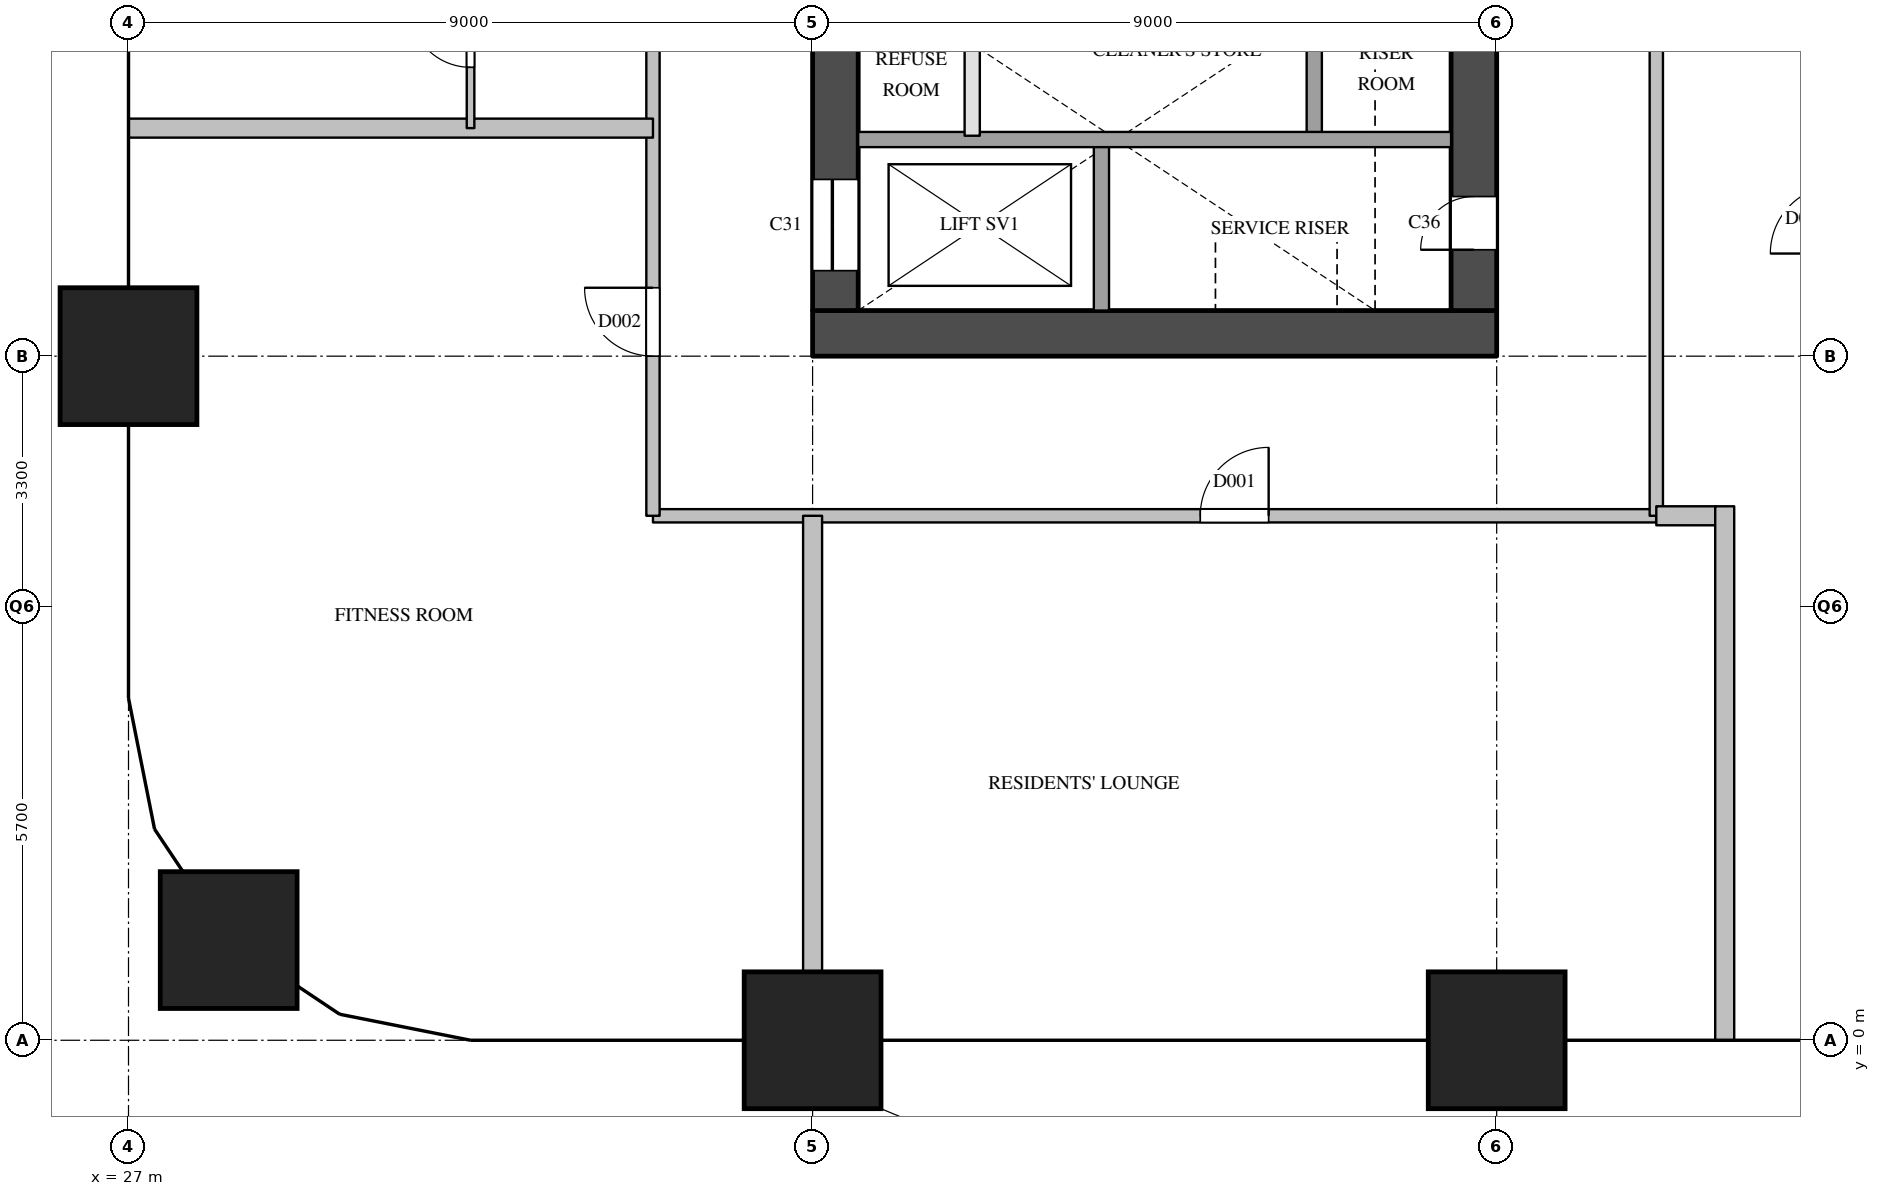
"""IFC4 building model, lengths in metres.
Left out: names, types, materials, properties, quantities, classifications, styles, units other than length and angle.
Written with IfcOpenShell. Run it as: python <this file> out.ifc"""

import sys

from ifc_helpers import new_model, si_unit, direction, frame, frame_2d, origin, origin_2d, place, context, subcontext, project, spatial, rectangle, extrude, element, fill, save


model = new_model("IFC4")
c1 = context("Model", 3, precision=1e-05, world=origin(), true_north=direction((0.0, 1.0)))
c2 = subcontext(c1, "Body", "Model", "MODEL_VIEW")
j1 = project(units=[si_unit("LENGTHUNIT", "METRE"), si_unit("PLANEANGLEUNIT", "RADIAN")], contexts=[c1])
p1 = place(None, origin())
s1 = spatial("IfcSite", under=j1, at=p1, CompositionType="ELEMENT")
p2 = place(p1, origin())
s2 = spatial("IfcBuilding", under=s1, at=p2, CompositionType="ELEMENT")
p3 = place(p2, frame((0.0, 0.0, 93.0)))
s3 = spatial("IfcBuildingStorey", under=s2, at=p3, CompositionType="ELEMENT", Elevation=93.0)
for number, where, z_axis, x_axis in (
    (1, (28.318, 1.318, 0.0), (0.0, 0.0, 1.0), (1.0, 0.0, 0.0)),
    (2, (27.0, 9.0, 0.0), (0.0, 0.0, 1.0), (1.0, 0.0, 0.0)),
    (3, (36.0, 0.0, 0.0), (0.0, 0.0, 1.0), (1.0, 0.0, 0.0)),
    (4, (45.0, 0.0, 0.0), (0.0, 0.0, 1.0), (1.0, 0.0, 0.0)),
):
    element("IfcColumn", number, at=place(p3, frame(where, z_axis=z_axis, x_axis=x_axis)), inside=s3, PredefinedType="COLUMN", context=c2, shape_type="SweptSolid", body=[
        extrude(rectangle(XDim=1.8, YDim=1.8, at=origin_2d()), origin(), (0.0, 0.0, 1.0), 3.8),
    ])
p4 = place(p3, frame((36.0, 9.3, 0.0), z_axis=(0.0, 0.0, 1.0), x_axis=(1.0, 0.0, 0.0)))
e5 = element("IfcWall", 5, at=p4, inside=s3, PredefinedType="SHEAR", context=c2, shape_type="SweptSolid", body=[
    extrude(rectangle(XDim=9.0, YDim=0.6, at=frame_2d((4.5, 0.0))), origin(), (0.0, 0.0, 1.0), 3.5),
])
p5 = place(p3, frame((36.3, 9.6, 0.0), z_axis=(0.0, 0.0, 1.0), x_axis=(0.0, 1.0, 0.0)))
e6 = element("IfcWall", 6, at=p5, inside=s3, PredefinedType="SHEAR", context=c2, shape_type="SweptSolid", body=[
    extrude(rectangle(XDim=12.3, YDim=0.6, at=frame_2d((6.15, 0.0))), origin(), (0.0, 0.0, 1.0), 3.5),
])
p6 = place(p5, frame((0.525, 0.0, 0.0)))
e7 = element("IfcOpeningElement", 7, at=p6, cuts=e6, PredefinedType="OPENING", context=c2, shape_type="SweptSolid", body=[
    extrude(rectangle(XDim=1.2, YDim=2.1, at=frame_2d((0.6, 1.05))), frame((0.0, 0.31, 0.0), z_axis=(0.0, -1.0, 0.0), x_axis=(1.0, 0.0, 0.0)), (0.0, 0.0, 1.0), 0.62),
])
p7 = place(p5, frame((4.8, 0.0, 0.0)))
e8 = element("IfcOpeningElement", 8, at=p7, cuts=e6, PredefinedType="OPENING", context=c2, shape_type="SweptSolid", body=[
    extrude(rectangle(XDim=1.0, YDim=2.1, at=frame_2d((0.5, 1.05))), frame((0.0, 0.31, 0.0), z_axis=(0.0, -1.0, 0.0), x_axis=(1.0, 0.0, 0.0)), (0.0, 0.0, 1.0), 0.62),
])
p8 = place(p3, frame((44.7, 9.6, 0.0), z_axis=(0.0, 0.0, 1.0), x_axis=(0.0, 1.0, 0.0)))
e9 = element("IfcWall", 9, at=p8, inside=s3, PredefinedType="SHEAR", context=c2, shape_type="SweptSolid", body=[
    extrude(rectangle(XDim=12.3, YDim=0.6, at=frame_2d((6.15, 0.0))), origin(), (0.0, 0.0, 1.0), 3.5),
])
p9 = place(p8, frame((0.8, 0.0, 0.0)))
e10 = element("IfcOpeningElement", 10, at=p9, cuts=e9, PredefinedType="OPENING", context=c2, shape_type="SweptSolid", body=[
    extrude(rectangle(XDim=0.7, YDim=2.1, at=frame_2d((0.35, 1.05))), frame((0.0, 0.31, 0.0), z_axis=(0.0, -1.0, 0.0), x_axis=(1.0, 0.0, 0.0)), (0.0, 0.0, 1.0), 0.62),
])
p10 = place(p3, frame((38.1, 11.9, 0.0), z_axis=(0.0, 0.0, 1.0), x_axis=(0.0, 1.0, 0.0)))
e11 = element("IfcWall", 11, at=p10, inside=s3, PredefinedType="PARTITIONING", context=c2, shape_type="SweptSolid", body=[
    extrude(rectangle(XDim=2.2, YDim=0.2, at=frame_2d((1.1, 0.0))), origin(), (0.0, 0.0, 1.0), 3.5),
])
p11 = place(p3, frame((39.8, 9.6, 0.0), z_axis=(0.0, 0.0, 1.0), x_axis=(0.0, 1.0, 0.0)))
e12 = element("IfcWall", 12, at=p11, inside=s3, PredefinedType="SOLIDWALL", context=c2, shape_type="SweptSolid", body=[
    extrude(rectangle(XDim=2.3, YDim=0.2, at=frame_2d((1.15, 0.0))), origin(), (0.0, 0.0, 1.0), 3.5),
])
p12 = place(p3, frame((42.6, 11.9, 0.0), z_axis=(0.0, 0.0, 1.0), x_axis=(0.0, 1.0, 0.0)))
e13 = element("IfcWall", 13, at=p12, inside=s3, PredefinedType="SOLIDWALL", context=c2, shape_type="SweptSolid", body=[
    extrude(rectangle(XDim=2.2, YDim=0.2, at=frame_2d((1.1, 0.0))), origin(), (0.0, 0.0, 1.0), 3.5),
])
p13 = place(p3, frame((36.6, 11.85, 0.0), z_axis=(0.0, 0.0, 1.0), x_axis=(1.0, 0.0, 0.0)))
e14 = element("IfcWall", 14, at=p13, inside=s3, PredefinedType="SOLIDWALL", context=c2, shape_type="SweptSolid", body=[
    extrude(rectangle(XDim=7.8, YDim=0.2, at=frame_2d((3.9, 0.0))), origin(), (0.0, 0.0, 1.0), 3.5),
])
p14 = place(p3, frame((33.9, 6.9, 0.0), z_axis=(0.0, 0.0, 1.0), x_axis=(1.0, 0.0, 0.0)))
e15 = element("IfcWall", 15, at=p14, inside=s3, PredefinedType="PARTITIONING", context=c2, shape_type="SweptSolid", body=[
    extrude(rectangle(XDim=13.2, YDim=0.175, at=frame_2d((6.6, 0.0))), origin(), (0.0, 0.0, 1.0), 3.5),
])
p15 = place(p14, frame((7.2, 0.0, 0.0)))
e16 = element("IfcOpeningElement", 16, at=p15, cuts=e15, PredefinedType="OPENING", context=c2, shape_type="SweptSolid", body=[
    extrude(rectangle(XDim=0.9, YDim=2.1, at=frame_2d((0.45, 1.05))), frame((0.0, 0.097, 0.0), z_axis=(0.0, -1.0, 0.0), x_axis=(1.0, 0.0, 0.0)), (0.0, 0.0, 1.0), 0.195),
])
p16 = place(p3, frame((33.9, 6.9, 0.0), z_axis=(0.0, 0.0, 1.0), x_axis=(0.0, 1.0, 0.0)))
e17 = element("IfcWall", 17, at=p16, inside=s3, PredefinedType="PARTITIONING", context=c2, shape_type="SweptSolid", body=[
    extrude(rectangle(XDim=17.69, YDim=0.175, at=frame_2d((8.845, 0.0))), origin(), (0.0, 0.0, 1.0), 3.5),
])
p17 = place(p16, frame((2.1, 0.0, 0.0)))
e18 = element("IfcOpeningElement", 18, at=p17, cuts=e17, PredefinedType="OPENING", context=c2, shape_type="SweptSolid", body=[
    extrude(rectangle(XDim=0.9, YDim=2.1, at=frame_2d((0.45, 1.05))), frame((0.0, 0.097, 0.0), z_axis=(0.0, -1.0, 0.0), x_axis=(1.0, 0.0, 0.0)), (0.0, 0.0, 1.0), 0.195),
])
p18 = place(p16, frame((8.8, 0.0, 0.0)))
e19 = element("IfcOpeningElement", 19, at=p18, cuts=e17, PredefinedType="OPENING", context=c2, shape_type="SweptSolid", body=[
    extrude(rectangle(XDim=1.0, YDim=2.1, at=frame_2d((0.5, 1.05))), frame((0.0, 0.097, 0.0), z_axis=(0.0, -1.0, 0.0), x_axis=(1.0, 0.0, 0.0)), (0.0, 0.0, 1.0), 0.195),
])
p19 = place(p16, frame((14.8, 0.0, 0.0)))
e20 = element("IfcOpeningElement", 20, at=p19, cuts=e17, PredefinedType="OPENING", context=c2, shape_type="SweptSolid", body=[
    extrude(rectangle(XDim=1.0, YDim=2.1, at=frame_2d((0.5, 1.05))), frame((0.0, 0.097, 0.0), z_axis=(0.0, -1.0, 0.0), x_axis=(1.0, 0.0, 0.0)), (0.0, 0.0, 1.0), 0.195),
])
p20 = place(p3, frame((47.1, 6.9, 0.0), z_axis=(0.0, 0.0, 1.0), x_axis=(0.0, 1.0, 0.0)))
e21 = element("IfcWall", 21, at=p20, inside=s3, PredefinedType="PARTITIONING", context=c2, shape_type="SweptSolid", body=[
    extrude(rectangle(XDim=17.09, YDim=0.175, at=frame_2d((8.545, 0.0))), origin(), (0.0, 0.0, 1.0), 3.5),
])
p21 = place(p20, frame((9.4, 0.0, 0.0)))
e22 = element("IfcOpeningElement", 22, at=p21, cuts=e21, PredefinedType="OPENING", context=c2, shape_type="SweptSolid", body=[
    extrude(rectangle(XDim=1.0, YDim=2.1, at=frame_2d((0.5, 1.05))), frame((0.0, 0.097, 0.0), z_axis=(0.0, -1.0, 0.0), x_axis=(1.0, 0.0, 0.0)), (0.0, 0.0, 1.0), 0.195),
])
p22 = place(p3, frame((47.1, 6.9, 0.0), z_axis=(0.0, 0.0, 1.0), x_axis=(1.0, 0.0, 0.0)))
e23 = element("IfcWall", 23, at=p22, inside=s3, PredefinedType="PARTITIONING", context=c2, shape_type="SweptSolid", body=[
    extrude(rectangle(XDim=0.775, YDim=0.25, at=frame_2d((0.387, 0.0))), origin(), (0.0, 0.0, 1.0), 3.5),
])
p23 = place(p3, frame((27.0, 12.0, 0.0), z_axis=(0.0, 0.0, 1.0), x_axis=(1.0, 0.0, 0.0)))
e24 = element("IfcWall", 24, at=p23, inside=s3, PredefinedType="PARTITIONING", context=c2, shape_type="SweptSolid", body=[
    extrude(rectangle(XDim=6.9, YDim=0.25, at=frame_2d((3.45, 0.0))), origin(), (0.0, 0.0, 1.0), 2.5),
])
p24 = place(p3, frame((36.0, 0.0, 0.0), z_axis=(0.0, 0.0, 1.0), x_axis=(0.0, 1.0, 0.0)))
e25 = element("IfcWall", 25, at=p24, inside=s3, PredefinedType="PARTITIONING", context=c2, shape_type="SweptSolid", body=[
    extrude(rectangle(XDim=6.9, YDim=0.25, at=frame_2d((3.45, 0.0))), origin(), (0.0, 0.0, 1.0), 3.5),
])
p25 = place(p3, frame((48.0, 0.0, 0.0), z_axis=(0.0, 0.0, 1.0), x_axis=(0.0, 1.0, 0.0)))
e26 = element("IfcWall", 26, at=p25, inside=s3, PredefinedType="PARTITIONING", context=c2, shape_type="SweptSolid", body=[
    extrude(rectangle(XDim=7.025, YDim=0.25, at=frame_2d((3.512, 0.0))), origin(), (0.0, 0.0, 1.0), 2.5),
])
p26 = place(p3, frame((31.5, 12.0, 0.0), z_axis=(0.0, 0.0, 1.0), x_axis=(0.0, 1.0, 0.0)))
e27 = element("IfcWall", 27, at=p26, inside=s3, PredefinedType="PARTITIONING", context=c2, shape_type="SweptSolid", body=[
    extrude(rectangle(XDim=2.4, YDim=0.1, at=frame_2d((1.2, 0.0))), origin(), (0.0, 0.0, 1.0), 3.5),
])
p27 = place(p26, frame((0.8, 0.0, 0.0)))
e28 = element("IfcOpeningElement", 28, at=p27, cuts=e27, PredefinedType="OPENING", context=c2, shape_type="SweptSolid", body=[
    extrude(rectangle(XDim=0.8, YDim=2.1, at=frame_2d((0.4, 1.05))), frame((0.0, 0.06, 0.0), z_axis=(0.0, -1.0, 0.0), x_axis=(1.0, 0.0, 0.0)), (0.0, 0.0, 1.0), 0.12),
])
p28 = place(p6, origin())
e29 = element("IfcDoor", 29, at=p28, inside=s3, OperationType="SLIDING_TO_LEFT", PredefinedType="DOOR", context=c2, shape_type="SweptSolid", body=[
    extrude(rectangle(XDim=1.2, YDim=2.1, at=frame_2d((0.6, 1.05))), frame((0.0, 0.025, 0.0), z_axis=(0.0, -1.0, 0.0), x_axis=(1.0, 0.0, 0.0)), (0.0, 0.0, 1.0), 0.05),
])
fill(e7, e29)
p29 = place(p9, origin())
e30 = element("IfcDoor", 30, at=p29, inside=s3, OperationType="SINGLE_SWING_LEFT", PredefinedType="DOOR", context=c2, shape_type="SweptSolid", body=[
    extrude(rectangle(XDim=0.7, YDim=2.1, at=frame_2d((0.35, 1.05))), frame((0.0, 0.025, 0.0), z_axis=(0.0, -1.0, 0.0), x_axis=(1.0, 0.0, 0.0)), (0.0, 0.0, 1.0), 0.05),
])
fill(e10, e30)
p30 = place(p15, origin())
e31 = element("IfcDoor", 31, at=p30, inside=s3, OperationType="SINGLE_SWING_RIGHT", PredefinedType="DOOR", context=c2, shape_type="SweptSolid", body=[
    extrude(rectangle(XDim=0.9, YDim=2.1, at=frame_2d((0.45, 1.05))), frame((0.0, 0.025, 0.0), z_axis=(0.0, -1.0, 0.0), x_axis=(1.0, 0.0, 0.0)), (0.0, 0.0, 1.0), 0.05),
])
fill(e16, e31)
p31 = place(p17, origin())
e32 = element("IfcDoor", 32, at=p31, inside=s3, OperationType="SINGLE_SWING_RIGHT", PredefinedType="DOOR", context=c2, shape_type="SweptSolid", body=[
    extrude(rectangle(XDim=0.9, YDim=2.1, at=frame_2d((0.45, 1.05))), frame((0.0, 0.025, 0.0), z_axis=(0.0, -1.0, 0.0), x_axis=(1.0, 0.0, 0.0)), (0.0, 0.0, 1.0), 0.05),
])
fill(e18, e32)
p32 = place(p27, origin())
e33 = element("IfcDoor", 33, at=p32, inside=s3, OperationType="SINGLE_SWING_RIGHT", PredefinedType="DOOR", context=c2, shape_type="SweptSolid", body=[
    extrude(rectangle(XDim=0.8, YDim=2.1, at=frame_2d((0.4, 1.05))), frame((0.0, 0.025, 0.0), z_axis=(0.0, -1.0, 0.0), x_axis=(1.0, 0.0, 0.0)), (0.0, 0.0, 1.0), 0.05),
])
fill(e28, e33)
save(model, sys.argv[1])
